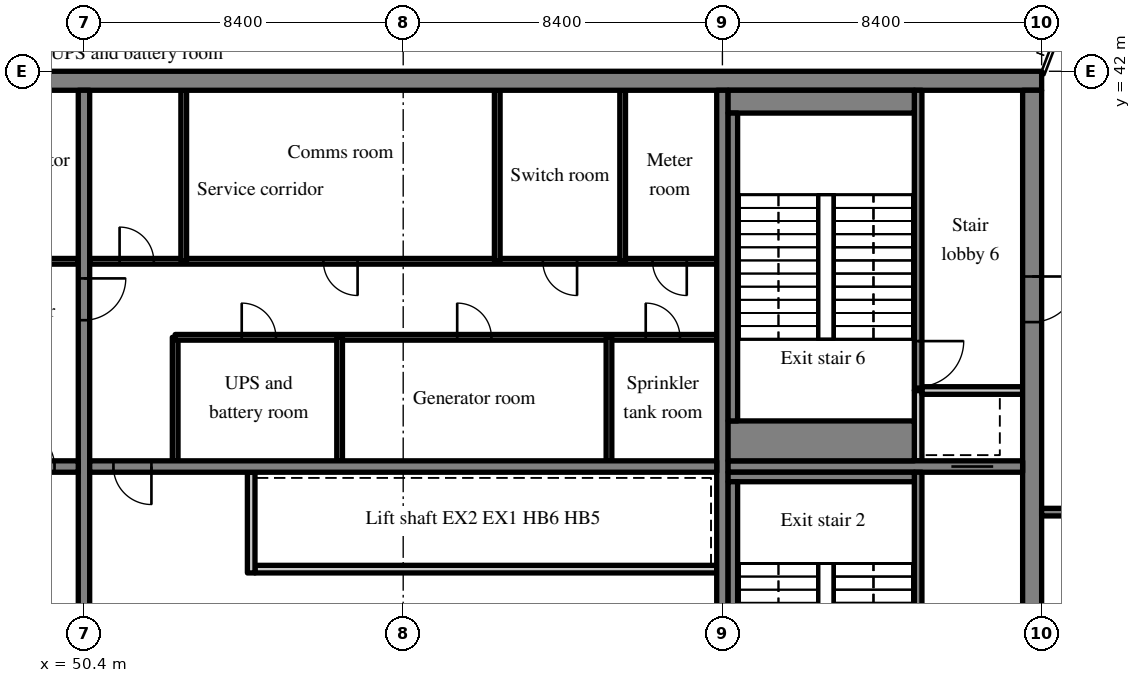
"""IFC4 building model, lengths in metres.
Left out: names, types, materials, properties, quantities, classifications, styles, units other than length and angle.
Written with IfcOpenShell. Run it as: python <this file> out.ifc"""

import sys

from ifc_helpers import new_model, si_unit, direction, frame, frame_2d, origin, place, context, subcontext, project, spatial, rectangle, extrude, source, transform, mapped, element, fill, save


model = new_model("IFC4")
c1 = context("Model", 3, precision=1e-05, world=origin(), true_north=direction((0.0, 1.0)))
c2 = subcontext(c1, "Body", "Model", "MODEL_VIEW")
j1 = project(units=[si_unit("LENGTHUNIT", "METRE"), si_unit("PLANEANGLEUNIT", "RADIAN")], contexts=[c1])
p1 = place(None, origin())
s1 = spatial("IfcSite", under=j1, at=p1, CompositionType="ELEMENT")
p2 = place(p1, origin())
s2 = spatial("IfcBuilding", under=s1, at=p2, CompositionType="ELEMENT")
p3 = place(p2, frame((0.0, 0.0, 270.1)))
s3 = spatial("IfcBuildingStorey", under=s2, at=p3, CompositionType="ELEMENT", Elevation=270.1)
m1 = source(origin(), c2, "Body", "SweptSolid", [
    extrude(rectangle(XDim=50.4, YDim=0.5, at=frame_2d((25.2, 0.0))), origin(), (0.0, 0.0, 1.0), 7.32),
])
p4 = place(p3, frame((25.2, 41.75, 0.0), z_axis=(0.0, 0.0, 1.0), x_axis=(1.0, 0.0, 0.0)))
e1 = element("IfcWall", 1, at=p4, inside=s3, PredefinedType="SHEAR", context=c2, shape_type="MappedRepresentation", body=[
    mapped(m1, transform((0.0, 0.0, 0.0), scale=1.0)),
])
m2 = source(origin(), c2, "Body", "SweptSolid", [
    extrude(rectangle(XDim=19.0, YDim=0.5, at=frame_2d((9.5, 0.0))), origin(), (0.0, 0.0, 1.0), 7.32),
])
p5 = place(p3, frame((75.35, 22.5, 0.0), z_axis=(0.0, 0.0, 1.0), x_axis=(0.0, 1.0, 0.0)))
e2 = element("IfcWall", 2, at=p5, inside=s3, PredefinedType="SHEAR", context=c2, shape_type="MappedRepresentation", body=[
    mapped(m2, transform((0.0, 0.0, 0.0), scale=1.0)),
])
m3 = source(origin(), c2, "Body", "SweptSolid", [
    extrude(rectangle(XDim=1.0, YDim=2.1, at=frame_2d((0.5, 1.05))), frame((0.0, 0.26, 0.0), z_axis=(0.0, -1.0, 0.0), x_axis=(1.0, 0.0, 0.0)), (0.0, 0.0, 1.0), 0.52),
])
p6 = place(p5, frame((3.0, 0.0, 0.0)))
e3 = element("IfcOpeningElement", 3, at=p6, cuts=e2, PredefinedType="OPENING", context=c2, shape_type="MappedRepresentation", body=[
    mapped(m3, transform((0.0, 0.0, 0.0), scale=1.0)),
])
m4 = source(origin(), c2, "Body", "SweptSolid", [
    extrude(rectangle(XDim=1.2, YDim=2.1, at=frame_2d((0.6, 1.05))), frame((0.0, 0.26, 0.0), z_axis=(0.0, -1.0, 0.0), x_axis=(1.0, 0.0, 0.0)), (0.0, 0.0, 1.0), 0.52),
])
p7 = place(p5, frame((12.9, 0.0, 0.0)))
e4 = element("IfcOpeningElement", 4, at=p7, cuts=e2, PredefinedType="OPENING", context=c2, shape_type="MappedRepresentation", body=[
    mapped(m4, transform((0.0, 0.0, 0.0), scale=1.0)),
])
m5 = source(origin(), c2, "Body", "SweptSolid", [
    extrude(rectangle(XDim=19.0, YDim=0.3, at=frame_2d((9.5, 0.0))), origin(), (0.0, 0.0, 1.0), 7.32),
])
p8 = place(p3, frame((50.4, 22.5, 0.0), z_axis=(0.0, 0.0, 1.0), x_axis=(0.0, 1.0, 0.0)))
e5 = element("IfcWall", 5, at=p8, inside=s3, PredefinedType="SHEAR", context=c2, shape_type="MappedRepresentation", body=[
    mapped(m5, transform((0.0, 0.0, 0.0), scale=1.0)),
])
m6 = source(origin(), c2, "Body", "SweptSolid", [
    extrude(rectangle(XDim=1.1, YDim=2.1, at=frame_2d((0.55, 1.05))), frame((0.0, 0.16, 0.0), z_axis=(0.0, -1.0, 0.0), x_axis=(1.0, 0.0, 0.0)), (0.0, 0.0, 1.0), 0.32),
])
p9 = place(p8, frame((12.95, 0.0, 0.0)))
e6 = element("IfcOpeningElement", 6, at=p9, cuts=e5, PredefinedType="OPENING", context=c2, shape_type="MappedRepresentation", body=[
    mapped(m6, transform((0.0, 0.0, 0.0), scale=1.0)),
])
p10 = place(p3, frame((67.2, 22.5, 0.0), z_axis=(0.0, 0.0, 1.0), x_axis=(0.0, 1.0, 0.0)))
e7 = element("IfcWall", 7, at=p10, inside=s3, PredefinedType="SHEAR", context=c2, shape_type="MappedRepresentation", body=[
    mapped(m5, transform((0.0, 0.0, 0.0), scale=1.0)),
])
m7 = source(origin(), c2, "Body", "SweptSolid", [
    extrude(rectangle(XDim=16.5, YDim=0.3, at=frame_2d((8.25, 0.0))), origin(), (0.0, 0.0, 1.0), 7.32),
])
p11 = place(p3, frame((33.75, 31.6, 0.0), z_axis=(0.0, 0.0, 1.0), x_axis=(1.0, 0.0, 0.0)))
e8 = element("IfcWall", 8, at=p11, inside=s3, PredefinedType="SHEAR", context=c2, shape_type="MappedRepresentation", body=[
    mapped(m7, transform((0.0, 0.0, 0.0), scale=1.0)),
])
m8 = source(origin(), c2, "Body", "SweptSolid", [
    extrude(rectangle(XDim=1.0, YDim=2.1, at=frame_2d((0.5, 1.05))), frame((0.0, 0.16, 0.0), z_axis=(0.0, -1.0, 0.0), x_axis=(1.0, 0.0, 0.0)), (0.0, 0.0, 1.0), 0.32),
])
p12 = place(p11, frame((14.875, 0.0, 0.0)))
e9 = element("IfcOpeningElement", 9, at=p12, cuts=e8, PredefinedType="OPENING", context=c2, shape_type="MappedRepresentation", body=[
    mapped(m8, transform((0.0, 0.0, 0.0), scale=1.0)),
])
p13 = place(p3, frame((50.55, 31.6, 0.0), z_axis=(0.0, 0.0, 1.0), x_axis=(1.0, 0.0, 0.0)))
e10 = element("IfcWall", 10, at=p13, inside=s3, PredefinedType="SHEAR", context=c2, shape_type="MappedRepresentation", body=[
    mapped(m7, transform((0.0, 0.0, 0.0), scale=1.0)),
])
p14 = place(p13, frame((0.625, 0.0, 0.0)))
e11 = element("IfcOpeningElement", 11, at=p14, cuts=e10, PredefinedType="OPENING", context=c2, shape_type="MappedRepresentation", body=[
    mapped(m8, transform((0.0, 0.0, 0.0), scale=1.0)),
])
m9 = source(origin(), c2, "Body", "SweptSolid", [
    extrude(rectangle(XDim=7.75, YDim=0.3, at=frame_2d((3.875, 0.0))), origin(), (0.0, 0.0, 1.0), 7.32),
])
p15 = place(p3, frame((67.35, 31.6, 0.0), z_axis=(0.0, 0.0, 1.0), x_axis=(1.0, 0.0, 0.0)))
e12 = element("IfcWall", 12, at=p15, inside=s3, PredefinedType="SHEAR", context=c2, shape_type="MappedRepresentation", body=[
    mapped(m9, transform((0.0, 0.0, 0.0), scale=1.0)),
])
p16 = place(p15, frame((5.875, 0.0, 0.0)))
e13 = element("IfcOpeningElement", 13, at=p16, cuts=e12, PredefinedType="OPENING", context=c2, shape_type="MappedRepresentation", body=[
    mapped(m6, transform((0.0, 0.0, 0.0), scale=1.0)),
])
m10 = source(origin(), c2, "Body", "SweptSolid", [
    extrude(rectangle(XDim=16.5, YDim=0.15, at=frame_2d((8.25, 0.0))), origin(), (0.0, 0.0, 1.0), 7.32),
])
p17 = place(p3, frame((33.75, 37.0, 0.0), z_axis=(0.0, 0.0, 1.0), x_axis=(1.0, 0.0, 0.0)))
e14 = element("IfcWall", 14, at=p17, inside=s3, PredefinedType="PARTITIONING", context=c2, shape_type="MappedRepresentation", body=[
    mapped(m10, transform((0.0, 0.0, 0.0), scale=1.0)),
])
m11 = source(origin(), c2, "Body", "SweptSolid", [
    extrude(rectangle(XDim=0.9, YDim=2.1, at=frame_2d((0.45, 1.05))), frame((0.0, 0.085, 0.0), z_axis=(0.0, -1.0, 0.0), x_axis=(1.0, 0.0, 0.0)), (0.0, 0.0, 1.0), 0.17),
])
p18 = place(p17, frame((3.262, 0.0, 0.0)))
e15 = element("IfcOpeningElement", 15, at=p18, cuts=e14, PredefinedType="OPENING", context=c2, shape_type="MappedRepresentation", body=[
    mapped(m11, transform((0.0, 0.0, 0.0), scale=1.0)),
])
p19 = place(p17, frame((8.212, 0.0, 0.0)))
e16 = element("IfcOpeningElement", 16, at=p19, cuts=e14, PredefinedType="OPENING", context=c2, shape_type="MappedRepresentation", body=[
    mapped(m11, transform((0.0, 0.0, 0.0), scale=1.0)),
])
p20 = place(p17, frame((11.512, 0.0, 0.0)))
e17 = element("IfcOpeningElement", 17, at=p20, cuts=e14, PredefinedType="OPENING", context=c2, shape_type="MappedRepresentation", body=[
    mapped(m11, transform((0.0, 0.0, 0.0), scale=1.0)),
])
p21 = place(p17, frame((14.813, 0.0, 0.0)))
e18 = element("IfcOpeningElement", 18, at=p21, cuts=e14, PredefinedType="OPENING", context=c2, shape_type="MappedRepresentation", body=[
    mapped(m11, transform((0.0, 0.0, 0.0), scale=1.0)),
])
m12 = source(origin(), c2, "Body", "SweptSolid", [
    extrude(rectangle(XDim=12.15, YDim=0.2, at=frame_2d((6.075, 0.0))), origin(), (0.0, 0.0, 1.0), 7.32),
])
p22 = place(p3, frame((67.05, 28.9, 0.0), z_axis=(0.0, 0.0, 1.0), x_axis=(-1.0, 0.0, 0.0)))
e19 = element("IfcWall", 19, at=p22, inside=s3, PredefinedType="SOLIDWALL", context=c2, shape_type="MappedRepresentation", body=[
    mapped(m12, transform((0.0, 0.0, 0.0), scale=1.0)),
])
m13 = source(origin(), c2, "Body", "SweptSolid", [
    extrude(rectangle(XDim=2.65, YDim=0.2, at=frame_2d((1.325, 0.0))), origin(), (0.0, 0.0, 1.0), 7.32),
])
p23 = place(p3, frame((54.8, 28.8, 0.0), z_axis=(0.0, 0.0, 1.0), x_axis=(0.0, 1.0, 0.0)))
e20 = element("IfcWall", 20, at=p23, inside=s3, PredefinedType="SOLIDWALL", context=c2, shape_type="MappedRepresentation", body=[
    mapped(m13, transform((0.0, 0.0, 0.0), scale=1.0)),
])
m14 = source(origin(), c2, "Body", "SweptSolid", [
    extrude(rectangle(XDim=3.25, YDim=0.15, at=frame_2d((1.625, 0.0))), origin(), (0.0, 0.0, 1.0), 7.32),
])
p24 = place(p3, frame((52.8, 31.75, 0.0), z_axis=(0.0, 0.0, 1.0), x_axis=(0.0, 1.0, 0.0)))
e21 = element("IfcWall", 21, at=p24, inside=s3, PredefinedType="PARTITIONING", context=c2, shape_type="MappedRepresentation", body=[
    mapped(m14, transform((0.0, 0.0, 0.0), scale=1.0)),
])
m15 = source(origin(), c2, "Body", "SweptSolid", [
    extrude(rectangle(XDim=14.25, YDim=0.15, at=frame_2d((7.125, 0.0))), origin(), (0.0, 0.0, 1.0), 7.32),
])
p25 = place(p3, frame((67.05, 35.0, 0.0), z_axis=(0.0, 0.0, 1.0), x_axis=(-1.0, 0.0, 0.0)))
e22 = element("IfcWall", 22, at=p25, inside=s3, PredefinedType="PARTITIONING", context=c2, shape_type="MappedRepresentation", body=[
    mapped(m15, transform((0.0, 0.0, 0.0), scale=1.0)),
])
p26 = place(p25, frame((0.968, 0.0, 0.0)))
e23 = element("IfcOpeningElement", 23, at=p26, cuts=e22, PredefinedType="OPENING", context=c2, shape_type="MappedRepresentation", body=[
    mapped(m11, transform((0.0, 0.0, 0.0), scale=1.0)),
])
p27 = place(p25, frame((5.929, 0.0, 0.0)))
e24 = element("IfcOpeningElement", 24, at=p27, cuts=e22, PredefinedType="OPENING", context=c2, shape_type="MappedRepresentation", body=[
    mapped(m11, transform((0.0, 0.0, 0.0), scale=1.0)),
])
p28 = place(p25, frame((11.599, 0.0, 0.0)))
e25 = element("IfcOpeningElement", 25, at=p28, cuts=e22, PredefinedType="OPENING", context=c2, shape_type="MappedRepresentation", body=[
    mapped(m11, transform((0.0, 0.0, 0.0), scale=1.0)),
])
p29 = place(p3, frame((67.05, 37.0, 0.0), z_axis=(0.0, 0.0, 1.0), x_axis=(-1.0, 0.0, 0.0)))
e26 = element("IfcWall", 26, at=p29, inside=s3, PredefinedType="PARTITIONING", context=c2, shape_type="MappedRepresentation", body=[
    mapped(m10, transform((0.0, 0.0, 0.0), scale=1.0)),
])
p30 = place(p29, frame((0.788, 0.0, 0.0)))
e27 = element("IfcOpeningElement", 27, at=p30, cuts=e26, PredefinedType="OPENING", context=c2, shape_type="MappedRepresentation", body=[
    mapped(m11, transform((0.0, 0.0, 0.0), scale=1.0)),
])
p31 = place(p29, frame((3.675, 0.0, 0.0)))
e28 = element("IfcOpeningElement", 28, at=p31, cuts=e26, PredefinedType="OPENING", context=c2, shape_type="MappedRepresentation", body=[
    mapped(m11, transform((0.0, 0.0, 0.0), scale=1.0)),
])
p32 = place(p29, frame((9.45, 0.0, 0.0)))
e29 = element("IfcOpeningElement", 29, at=p32, cuts=e26, PredefinedType="OPENING", context=c2, shape_type="MappedRepresentation", body=[
    mapped(m11, transform((0.0, 0.0, 0.0), scale=1.0)),
])
p33 = place(p29, frame((14.813, 0.0, 0.0)))
e30 = element("IfcOpeningElement", 30, at=p33, cuts=e26, PredefinedType="OPENING", context=c2, shape_type="MappedRepresentation", body=[
    mapped(m11, transform((0.0, 0.0, 0.0), scale=1.0)),
])
for number, where, z_axis, x_axis in (
    (31, (64.215, 31.75, 0.0), (0.0, 0.0, 1.0), (0.0, 1.0, 0.0)),
    (32, (57.127, 31.75, 0.0), (0.0, 0.0, 1.0), (0.0, 1.0, 0.0)),
):
    element("IfcWall", number, at=place(p3, frame(where, z_axis=z_axis, x_axis=x_axis)), inside=s3, PredefinedType="PARTITIONING", context=c2, shape_type="MappedRepresentation", body=[
        mapped(m14, transform((0.0, 0.0, 0.0), scale=1.0)),
    ])
m16 = source(origin(), c2, "Body", "SweptSolid", [
    extrude(rectangle(XDim=4.5, YDim=0.15, at=frame_2d((2.25, 0.0))), origin(), (0.0, 0.0, 1.0), 7.32),
])
for number, where, z_axis, x_axis in (
    (33, (64.575, 37.0, 0.0), (0.0, 0.0, 1.0), (0.0, 1.0, 0.0)),
    (34, (61.275, 37.0, 0.0), (0.0, 0.0, 1.0), (0.0, 1.0, 0.0)),
    (35, (53.025, 37.0, 0.0), (0.0, 0.0, 1.0), (0.0, 1.0, 0.0)),
):
    element("IfcWall", number, at=place(p3, frame(where, z_axis=z_axis, x_axis=x_axis)), inside=s3, PredefinedType="PARTITIONING", context=c2, shape_type="MappedRepresentation", body=[
        mapped(m16, transform((0.0, 0.0, 0.0), scale=1.0)),
    ])
m17 = source(origin(), c2, "Body", "SweptSolid", [
    extrude(rectangle(XDim=8.95, YDim=0.2, at=frame_2d((4.475, 0.0))), origin(), (0.0, 0.0, 1.0), 7.32),
])
p34 = place(p3, frame((72.35, 22.5, 0.0), z_axis=(0.0, 0.0, 1.0), x_axis=(0.0, 1.0, 0.0)))
e36 = element("IfcWall", 36, at=p34, inside=s3, PredefinedType="SOLIDWALL", context=c2, shape_type="MappedRepresentation", body=[
    mapped(m17, transform((0.0, 0.0, 0.0), scale=1.0)),
])
m18 = source(origin(), c2, "Body", "SweptSolid", [
    extrude(rectangle(XDim=1.2, YDim=2.1, at=frame_2d((0.6, 1.05))), frame((0.0, 0.11, 0.0), z_axis=(0.0, -1.0, 0.0), x_axis=(1.0, 0.0, 0.0)), (0.0, 0.0, 1.0), 0.22),
])
p35 = place(p34, frame((1.1, 0.0, 0.0)))
e37 = element("IfcOpeningElement", 37, at=p35, cuts=e36, PredefinedType="OPENING", context=c2, shape_type="MappedRepresentation", body=[
    mapped(m18, transform((0.0, 0.0, 0.0), scale=1.0)),
])
m19 = source(origin(), c2, "Body", "SweptSolid", [
    extrude(rectangle(XDim=1.85, YDim=0.2, at=frame_2d((0.925, 0.0))), origin(), (0.0, 0.0, 1.0), 7.32),
])
p36 = place(p3, frame((72.35, 31.75, 0.0), z_axis=(0.0, 0.0, 1.0), x_axis=(0.0, 1.0, 0.0)))
e38 = element("IfcWall", 38, at=p36, inside=s3, PredefinedType="SOLIDWALL", context=c2, shape_type="MappedRepresentation", body=[
    mapped(m19, transform((0.0, 0.0, 0.0), scale=1.0)),
])
m20 = source(origin(), c2, "Body", "SweptSolid", [
    extrude(rectangle(XDim=2.65, YDim=0.2, at=frame_2d((1.325, 0.0))), origin(), (0.0, 0.0, 1.0), 7.32),
])
p37 = place(p3, frame((72.45, 33.6, 0.0), z_axis=(0.0, 0.0, 1.0), x_axis=(1.0, 0.0, 0.0)))
e39 = element("IfcWall", 39, at=p37, inside=s3, PredefinedType="SOLIDWALL", context=c2, shape_type="MappedRepresentation", body=[
    mapped(m20, transform((0.0, 0.0, 0.0), scale=1.0)),
])
m21 = source(origin(), c2, "Body", "SweptSolid", [
    extrude(rectangle(XDim=7.9, YDim=0.2, at=frame_2d((3.95, 0.0))), origin(), (0.0, 0.0, 1.0), 7.32),
])
p38 = place(p3, frame((72.35, 33.6, 0.0), z_axis=(0.0, 0.0, 1.0), x_axis=(0.0, 1.0, 0.0)))
e40 = element("IfcWall", 40, at=p38, inside=s3, PredefinedType="SOLIDWALL", context=c2, shape_type="MappedRepresentation", body=[
    mapped(m21, transform((0.0, 0.0, 0.0), scale=1.0)),
])
p39 = place(p38, frame((0.1, 0.0, 0.0)))
e41 = element("IfcOpeningElement", 41, at=p39, cuts=e40, PredefinedType="OPENING", context=c2, shape_type="MappedRepresentation", body=[
    mapped(m18, transform((0.0, 0.0, 0.0), scale=1.0)),
])
m22 = source(origin(), c2, "Body", "SweptSolid", [
    extrude(rectangle(XDim=8.15, YDim=0.2, at=frame_2d((4.075, 0.0))), origin(), (0.0, 0.0, 1.0), 7.32),
])
p40 = place(p3, frame((83.75, 30.4, 0.0), z_axis=(0.0, 0.0, 1.0), x_axis=(-1.0, 0.0, 0.0)))
e42 = element("IfcWall", 42, at=p40, inside=s3, PredefinedType="SOLIDWALL", context=c2, shape_type="MappedRepresentation", body=[
    mapped(m22, transform((0.0, 0.0, 0.0), scale=1.0)),
])
m23 = source(origin(), c2, "Body", "SweptSolid", [
    extrude(rectangle(XDim=1.0, YDim=2.1, at=frame_2d((0.5, 1.05))), frame((0.0, 0.11, 0.0), z_axis=(0.0, -1.0, 0.0), x_axis=(1.0, 0.0, 0.0)), (0.0, 0.0, 1.0), 0.22),
])
p41 = place(p40, frame((6.05, 0.0, 0.0)))
e43 = element("IfcOpeningElement", 43, at=p41, cuts=e42, PredefinedType="OPENING", context=c2, shape_type="MappedRepresentation", body=[
    mapped(m23, transform((0.0, 0.0, 0.0), scale=1.0)),
])
m24 = source(origin(), c2, "Body", "SweptSolid", [
    extrude(rectangle(XDim=4.9, YDim=0.25, at=frame_2d((2.45, 0.0))), origin(), (0.0, 0.0, 1.0), 7.32),
])
p42 = place(p3, frame((67.35, 31.325, 0.0), z_axis=(0.0, 0.0, 1.0), x_axis=(1.0, 0.0, 0.0)))
e44 = element("IfcWall", 44, at=p42, inside=s3, PredefinedType="SOLIDWALL", context=c2, shape_type="MappedRepresentation", body=[
    mapped(m24, transform((0.0, 0.0, 0.0), scale=1.0)),
])
m25 = source(origin(), c2, "Body", "SweptSolid", [
    extrude(rectangle(XDim=8.1, YDim=0.25, at=frame_2d((4.05, 0.0))), origin(), (0.0, 0.0, 1.0), 7.32),
])
p43 = place(p3, frame((67.475, 23.1, 0.0), z_axis=(0.0, 0.0, 1.0), x_axis=(0.0, 1.0, 0.0)))
e45 = element("IfcWall", 45, at=p43, inside=s3, PredefinedType="SOLIDWALL", context=c2, shape_type="MappedRepresentation", body=[
    mapped(m25, transform((0.0, 0.0, 0.0), scale=1.0)),
])
m26 = source(origin(), c2, "Body", "SweptSolid", [
    extrude(rectangle(XDim=4.9, YDim=0.6, at=frame_2d((2.45, 0.0))), origin(), (0.0, 0.0, 1.0), 7.32),
])
p44 = place(p3, frame((67.35, 41.2, 0.0), z_axis=(0.0, 0.0, 1.0), x_axis=(1.0, 0.0, 0.0)))
e46 = element("IfcWall", 46, at=p44, inside=s3, PredefinedType="SOLIDWALL", context=c2, shape_type="MappedRepresentation", body=[
    mapped(m26, transform((0.0, 0.0, 0.0), scale=1.0)),
])
m27 = source(origin(), c2, "Body", "SweptSolid", [
    extrude(rectangle(XDim=4.9, YDim=1.05, at=frame_2d((2.45, 0.0))), origin(), (0.0, 0.0, 1.0), 7.32),
])
p45 = place(p3, frame((67.35, 32.275, 0.0), z_axis=(0.0, 0.0, 1.0), x_axis=(1.0, 0.0, 0.0)))
e47 = element("IfcWall", 47, at=p45, inside=s3, PredefinedType="SOLIDWALL", context=c2, shape_type="MappedRepresentation", body=[
    mapped(m27, transform((0.0, 0.0, 0.0), scale=1.0)),
])
p46 = place(p3, frame((67.475, 32.8, 0.0), z_axis=(0.0, 0.0, 1.0), x_axis=(0.0, 1.0, 0.0)))
e48 = element("IfcWall", 48, at=p46, inside=s3, PredefinedType="SOLIDWALL", context=c2, shape_type="MappedRepresentation", body=[
    mapped(m25, transform((0.0, 0.0, 0.0), scale=1.0)),
])
m28 = source(origin(), c2, "Body", "SweptSolid", [
    extrude(rectangle(XDim=1.0, YDim=2.1, at=frame_2d((0.5, 1.05))), frame((0.0, 0.025, 0.0), z_axis=(0.0, -1.0, 0.0), x_axis=(1.0, 0.0, 0.0)), (0.0, 0.0, 1.0), 0.05),
])
p47 = place(p12, origin())
e49 = element("IfcDoor", 49, at=p47, inside=s3, OperationType="SINGLE_SWING_LEFT", PredefinedType="DOOR", context=c2, shape_type="MappedRepresentation", body=[
    mapped(m28, transform((0.0, 0.0, 0.0), scale=1.0)),
])
fill(e9, e49)
p48 = place(p14, origin())
e50 = element("IfcDoor", 50, at=p48, inside=s3, OperationType="SINGLE_SWING_RIGHT", PredefinedType="DOOR", context=c2, shape_type="MappedRepresentation", body=[
    mapped(m28, transform((0.0, 0.0, 0.0), scale=1.0)),
])
fill(e11, e50)
m29 = source(origin(), c2, "Body", "SweptSolid", [
    extrude(rectangle(XDim=0.9, YDim=2.1, at=frame_2d((0.45, 1.05))), frame((0.0, 0.025, 0.0), z_axis=(0.0, -1.0, 0.0), x_axis=(1.0, 0.0, 0.0)), (0.0, 0.0, 1.0), 0.05),
])
p49 = place(p26, origin())
e51 = element("IfcDoor", 51, at=p49, inside=s3, OperationType="SINGLE_SWING_RIGHT", PredefinedType="DOOR", context=c2, shape_type="MappedRepresentation", body=[
    mapped(m29, transform((0.0, 0.0, 0.0), scale=1.0)),
])
fill(e23, e51)
p50 = place(p27, origin())
e52 = element("IfcDoor", 52, at=p50, inside=s3, OperationType="SINGLE_SWING_RIGHT", PredefinedType="DOOR", context=c2, shape_type="MappedRepresentation", body=[
    mapped(m29, transform((0.0, 0.0, 0.0), scale=1.0)),
])
fill(e24, e52)
p51 = place(p28, origin())
e53 = element("IfcDoor", 53, at=p51, inside=s3, OperationType="SINGLE_SWING_RIGHT", PredefinedType="DOOR", context=c2, shape_type="MappedRepresentation", body=[
    mapped(m29, transform((0.0, 0.0, 0.0), scale=1.0)),
])
fill(e25, e53)
p52 = place(p30, origin())
e54 = element("IfcDoor", 54, at=p52, inside=s3, OperationType="SINGLE_SWING_LEFT", PredefinedType="DOOR", context=c2, shape_type="MappedRepresentation", body=[
    mapped(m29, transform((0.0, 0.0, 0.0), scale=1.0)),
])
fill(e27, e54)
p53 = place(p31, origin())
e55 = element("IfcDoor", 55, at=p53, inside=s3, OperationType="SINGLE_SWING_LEFT", PredefinedType="DOOR", context=c2, shape_type="MappedRepresentation", body=[
    mapped(m29, transform((0.0, 0.0, 0.0), scale=1.0)),
])
fill(e28, e55)
p54 = place(p32, origin())
e56 = element("IfcDoor", 56, at=p54, inside=s3, OperationType="SINGLE_SWING_LEFT", PredefinedType="DOOR", context=c2, shape_type="MappedRepresentation", body=[
    mapped(m29, transform((0.0, 0.0, 0.0), scale=1.0)),
])
fill(e29, e56)
p55 = place(p33, origin())
e57 = element("IfcDoor", 57, at=p55, inside=s3, OperationType="SINGLE_SWING_RIGHT", PredefinedType="DOOR", context=c2, shape_type="MappedRepresentation", body=[
    mapped(m29, transform((0.0, 0.0, 0.0), scale=1.0)),
])
fill(e30, e57)
m30 = source(origin(), c2, "Body", "SweptSolid", [
    extrude(rectangle(XDim=1.1, YDim=2.1, at=frame_2d((0.55, 1.05))), frame((0.0, 0.025, 0.0), z_axis=(0.0, -1.0, 0.0), x_axis=(1.0, 0.0, 0.0)), (0.0, 0.0, 1.0), 0.05),
])
p56 = place(p16, origin())
e58 = element("IfcDoor", 58, at=p56, inside=s3, OperationType="SLIDING_TO_LEFT", PredefinedType="DOOR", context=c2, shape_type="MappedRepresentation", body=[
    mapped(m30, transform((0.0, 0.0, 0.0), scale=1.0)),
])
fill(e13, e58)
m31 = source(origin(), c2, "Body", "SweptSolid", [
    extrude(rectangle(XDim=1.2, YDim=2.1, at=frame_2d((0.6, 1.05))), frame((0.0, 0.025, 0.0), z_axis=(0.0, -1.0, 0.0), x_axis=(1.0, 0.0, 0.0)), (0.0, 0.0, 1.0), 0.05),
])
p57 = place(p39, origin())
e59 = element("IfcDoor", 59, at=p57, inside=s3, OperationType="SINGLE_SWING_RIGHT", PredefinedType="DOOR", context=c2, shape_type="MappedRepresentation", body=[
    mapped(m31, transform((0.0, 0.0, 0.0), scale=1.0)),
])
fill(e41, e59)
p58 = place(p7, origin())
e60 = element("IfcDoor", 60, at=p58, inside=s3, OperationType="SINGLE_SWING_RIGHT", PredefinedType="DOOR", context=c2, shape_type="MappedRepresentation", body=[
    mapped(m31, transform((0.0, 0.0, 0.0), scale=1.0)),
])
fill(e4, e60)
p59 = place(p9, origin())
e61 = element("IfcDoor", 61, at=p59, inside=s3, OperationType="SINGLE_SWING_RIGHT", PredefinedType="DOOR", context=c2, shape_type="MappedRepresentation", body=[
    mapped(m30, transform((0.0, 0.0, 0.0), scale=1.0)),
])
fill(e6, e61)
save(model, sys.argv[1])
